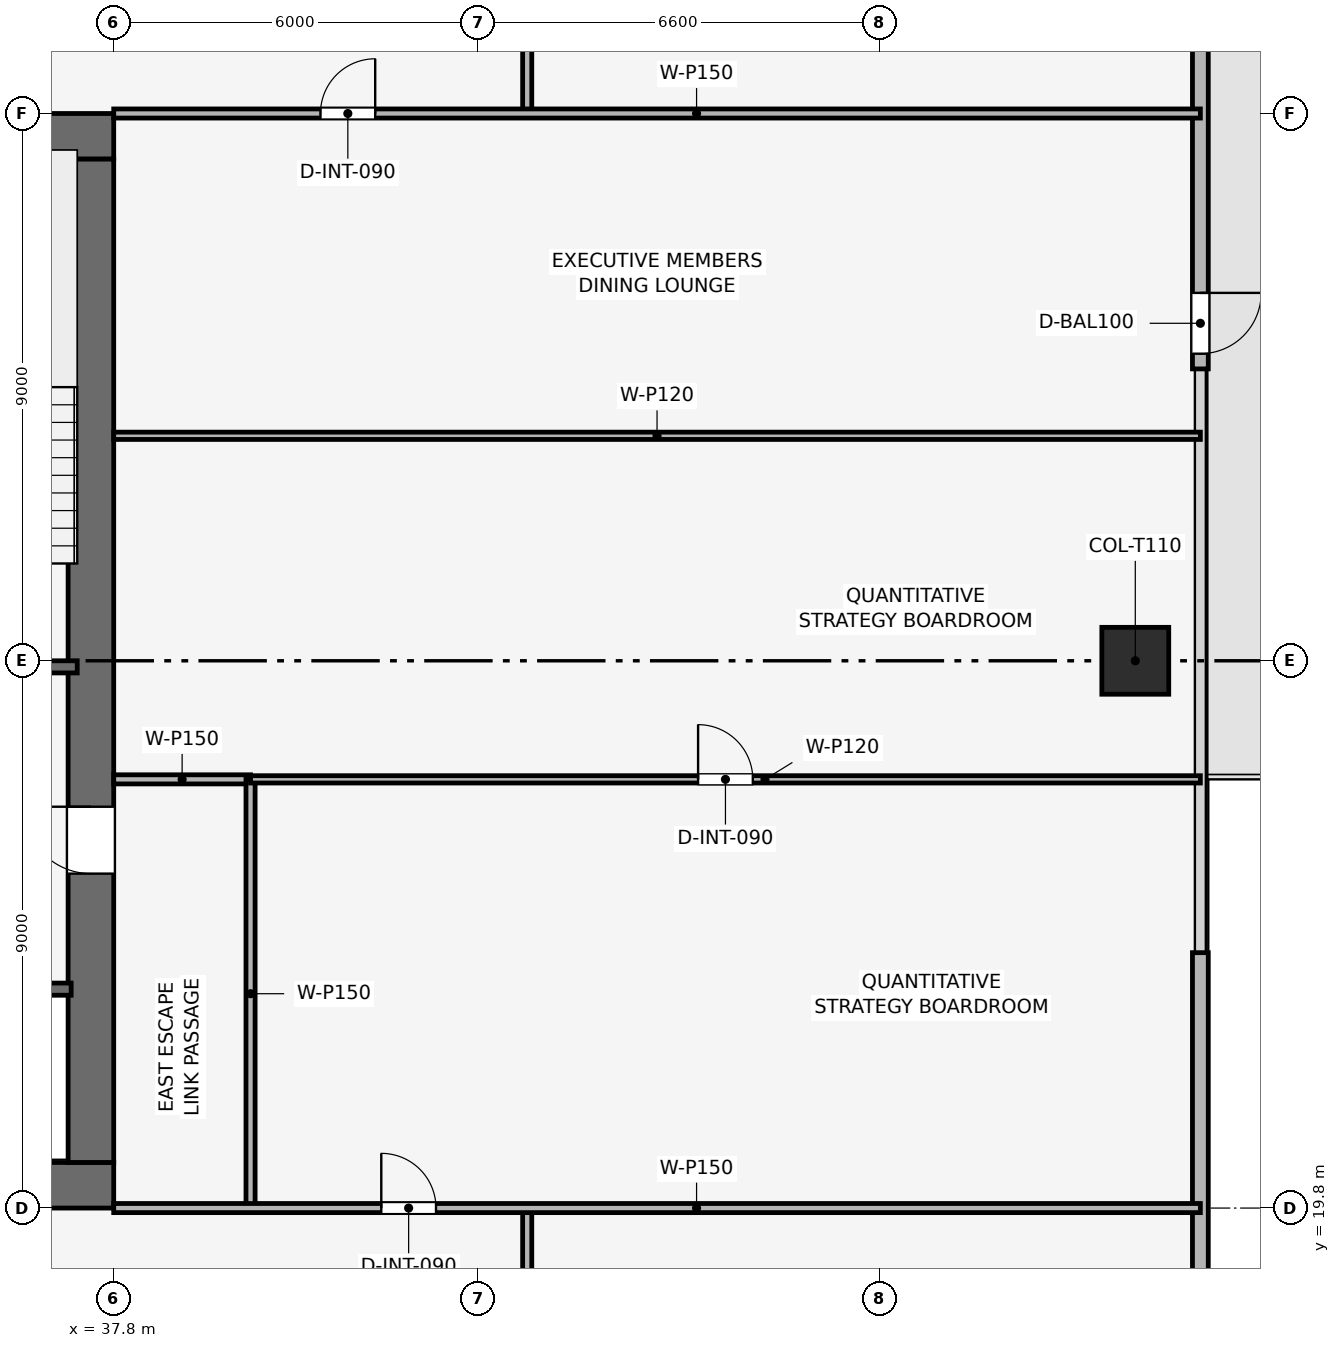
"""IFC4 building model, lengths in metres.
Left out: names, types, materials, properties, quantities, classifications, styles, units other than length and angle.
Written with IfcOpenShell. Run it as: python <this file> out.ifc"""

import sys

from ifc_helpers import new_model, si_unit, direction, frame, frame_2d, origin, origin_2d, place, context, subcontext, project, spatial, rectangle, extrude, element, fill, save


model = new_model("IFC4")
c1 = context("Model", 3, precision=1e-05, world=origin(), true_north=direction((0.0, 1.0)))
c2 = subcontext(c1, "Body", "Model", "MODEL_VIEW")
j1 = project(units=[si_unit("LENGTHUNIT", "METRE"), si_unit("PLANEANGLEUNIT", "RADIAN")], contexts=[c1])
p1 = place(None, origin())
s1 = spatial("IfcSite", under=j1, at=p1, CompositionType="ELEMENT")
p2 = place(p1, origin())
s2 = spatial("IfcBuilding", under=s1, at=p2, CompositionType="ELEMENT")
p3 = place(p2, frame((0.0, 0.0, 222.45)))
s3 = spatial("IfcBuildingStorey", under=s2, at=p3, CompositionType="ELEMENT", Elevation=222.45)
p4 = place(p3, frame((19.8, 20.175, 0.0), z_axis=(0.0, 0.0, 1.0), x_axis=(1.0, 0.0, 0.0)))
e1 = element("IfcWall", 1, at=p4, inside=s3, PredefinedType="SHEAR", context=c2, shape_type="SweptSolid", body=[
    extrude(rectangle(XDim=18.0, YDim=0.75, at=frame_2d((9.0, 0.0))), origin(), (0.0, 0.0, 1.0), 3.75),
])
p5 = place(p4, frame((8.4, 0.0, 0.0)))
e2 = element("IfcOpeningElement", 2, at=p5, cuts=e1, PredefinedType="OPENING", context=c2, shape_type="SweptSolid", body=[
    extrude(rectangle(XDim=1.2, YDim=2.2, at=frame_2d((0.6, 1.1))), frame((0.0, 0.385, 0.0), z_axis=(0.0, -1.0, 0.0), x_axis=(1.0, 0.0, 0.0)), (0.0, 0.0, 1.0), 0.77),
])
p6 = place(p3, frame((19.8, 37.425, 0.0), z_axis=(0.0, 0.0, 1.0), x_axis=(1.0, 0.0, 0.0)))
e3 = element("IfcWall", 3, at=p6, inside=s3, PredefinedType="SHEAR", context=c2, shape_type="SweptSolid", body=[
    extrude(rectangle(XDim=18.0, YDim=0.75, at=frame_2d((9.0, 0.0))), origin(), (0.0, 0.0, 1.0), 3.75),
])
p7 = place(p6, frame((7.05, 0.0, 0.0)))
e4 = element("IfcOpeningElement", 4, at=p7, cuts=e3, PredefinedType="OPENING", context=c2, shape_type="SweptSolid", body=[
    extrude(rectangle(XDim=1.1, YDim=2.15, at=frame_2d((0.55, 1.075))), frame((0.0, 0.385, 0.0), z_axis=(0.0, -1.0, 0.0), x_axis=(1.0, 0.0, 0.0)), (0.0, 0.0, 1.0), 0.77),
])
p8 = place(p3, frame((37.425, 20.55, 0.0), z_axis=(0.0, 0.0, 1.0), x_axis=(0.0, 1.0, 0.0)))
e5 = element("IfcWall", 5, at=p8, inside=s3, PredefinedType="SHEAR", context=c2, shape_type="SweptSolid", body=[
    extrude(rectangle(XDim=16.5, YDim=0.75, at=frame_2d((8.25, 0.0))), origin(), (0.0, 0.0, 1.0), 3.75),
])
p9 = place(p8, frame((4.75, 0.0, 0.0)))
e6 = element("IfcOpeningElement", 6, at=p9, cuts=e5, PredefinedType="OPENING", context=c2, shape_type="SweptSolid", body=[
    extrude(rectangle(XDim=1.1, YDim=2.15, at=frame_2d((0.55, 1.075))), frame((0.0, 0.385, 0.0), z_axis=(0.0, -1.0, 0.0), x_axis=(1.0, 0.0, 0.0)), (0.0, 0.0, 1.0), 0.77),
])
p10 = place(p3, frame((54.6, 28.8, 0.003), z_axis=(0.0, 0.0, 1.0), x_axis=(1.0, 0.0, 0.0)))
e7 = element("IfcColumn", 7, at=p10, inside=s3, PredefinedType="COLUMN", context=c2, shape_type="SweptSolid", body=[
    extrude(rectangle(XDim=1.1, YDim=1.1, at=origin_2d()), origin(), (0.0, 0.0, 1.0), 3.494),
])
p11 = place(p3, frame((55.67, 48.3, 0.0), z_axis=(0.0, 0.0, 1.0), x_axis=(0.0, -1.0, 0.0)))
e8 = element("IfcWall", 8, at=p11, inside=s3, PredefinedType="SOLIDWALL", context=c2, shape_type="SweptSolid", body=[
    extrude(rectangle(XDim=14.7, YDim=0.26, at=frame_2d((7.35, 0.0))), origin(), (0.0, 0.0, 1.0), 3.5),
])
p12 = place(p11, frame((13.45, 0.0, 0.0)))
e9 = element("IfcOpeningElement", 9, at=p12, cuts=e8, PredefinedType="OPENING", context=c2, shape_type="SweptSolid", body=[
    extrude(rectangle(XDim=1.0, YDim=2.2, at=frame_2d((0.5, 1.1))), frame((0.0, 0.14, 0.0), z_axis=(0.0, -1.0, 0.0), x_axis=(1.0, 0.0, 0.0)), (0.0, 0.0, 1.0), 0.28),
])
p13 = place(p3, frame((55.67, 24.0, 0.0), z_axis=(0.0, 0.0, 1.0), x_axis=(0.0, -1.0, 0.0)))
e10 = element("IfcWall", 10, at=p13, inside=s3, PredefinedType="SOLIDWALL", context=c2, shape_type="SweptSolid", body=[
    extrude(rectangle(XDim=14.7, YDim=0.26, at=frame_2d((7.35, 0.0))), origin(), (0.0, 0.0, 1.0), 3.5),
])
p14 = place(p13, frame((10.65, 0.0, 0.9)))
e11 = element("IfcOpeningElement", 11, at=p14, cuts=e10, PredefinedType="OPENING", context=c2, shape_type="SweptSolid", body=[
    extrude(rectangle(XDim=3.8, YDim=1.9, at=frame_2d((1.9, 0.95))), frame((0.0, 0.14, 0.0), z_axis=(0.0, -1.0, 0.0), x_axis=(1.0, 0.0, 0.0)), (0.0, 0.0, 1.0), 0.28),
])
p15 = place(p3, frame((34.05, 28.7, 0.0), z_axis=(0.0, 0.0, 1.0), x_axis=(1.0, 0.0, 0.0)))
e12 = element("IfcWall", 12, at=p15, inside=s3, PredefinedType="SHEAR", context=c2, shape_type="SweptSolid", body=[
    extrude(rectangle(XDim=3.15, YDim=0.2, at=frame_2d((1.575, 0.0))), origin(), (0.0, 0.0, 1.0), 3.5),
])
p16 = place(p15, frame((0.8, 0.0, 0.0)))
e13 = element("IfcOpeningElement", 13, at=p16, cuts=e12, PredefinedType="OPENING", context=c2, shape_type="SweptSolid", body=[
    extrude(rectangle(XDim=1.0, YDim=2.1, at=frame_2d((0.5, 1.05))), frame((0.0, 0.11, 0.0), z_axis=(0.0, -1.0, 0.0), x_axis=(1.0, 0.0, 0.0)), (0.0, 0.0, 1.0), 0.22),
])
p17 = place(p3, frame((34.05, 23.4, 0.0), z_axis=(0.0, 0.0, 1.0), x_axis=(1.0, 0.0, 0.0)))
e14 = element("IfcWall", 14, at=p17, inside=s3, PredefinedType="SHEAR", context=c2, shape_type="SweptSolid", body=[
    extrude(rectangle(XDim=3.05, YDim=0.2, at=frame_2d((1.525, 0.0))), origin(), (0.0, 0.0, 1.0), 3.5),
])
p18 = place(p17, frame((1.2, 0.0, 0.0)))
e15 = element("IfcOpeningElement", 15, at=p18, cuts=e14, PredefinedType="OPENING", context=c2, shape_type="SweptSolid", body=[
    extrude(rectangle(XDim=1.1, YDim=2.15, at=frame_2d((0.55, 1.075))), frame((0.0, 0.11, 0.0), z_axis=(0.0, -1.0, 0.0), x_axis=(1.0, 0.0, 0.0)), (0.0, 0.0, 1.0), 0.22),
])
p19 = place(p3, frame((37.8, 26.85, 0.0), z_axis=(0.0, 0.0, 1.0), x_axis=(1.0, 0.0, 0.0)))
e16 = element("IfcWall", 16, at=p19, inside=s3, PredefinedType="PARTITIONING", context=c2, shape_type="SweptSolid", body=[
    extrude(rectangle(XDim=2.25, YDim=0.15, at=frame_2d((1.125, 0.0))), origin(), (0.0, 0.0, 1.0), 3.5),
])
p20 = place(p3, frame((40.05, 19.8, 0.0), z_axis=(0.0, 0.0, 1.0), x_axis=(0.0, 1.0, 0.0)))
e17 = element("IfcWall", 17, at=p20, inside=s3, PredefinedType="PARTITIONING", context=c2, shape_type="SweptSolid", body=[
    extrude(rectangle(XDim=7.05, YDim=0.15, at=frame_2d((3.525, 0.0))), origin(), (0.0, 0.0, 1.0), 3.035),
])
p21 = place(p3, frame((40.05, 26.85, 0.0), z_axis=(0.0, 0.0, 1.0), x_axis=(1.0, 0.0, 0.0)))
e18 = element("IfcWall", 18, at=p21, inside=s3, PredefinedType="PARTITIONING", context=c2, shape_type="SweptSolid", body=[
    extrude(rectangle(XDim=15.62, YDim=0.12, at=frame_2d((7.81, 0.0))), origin(), (0.0, 0.0, 1.0), 2.885),
])
p22 = place(p21, frame((7.36, 0.0, 0.0)))
e19 = element("IfcOpeningElement", 19, at=p22, cuts=e18, PredefinedType="OPENING", context=c2, shape_type="SweptSolid", body=[
    extrude(rectangle(XDim=0.9, YDim=2.1, at=frame_2d((0.45, 1.05))), frame((0.0, 0.07, 0.0), z_axis=(0.0, -1.0, 0.0), x_axis=(1.0, 0.0, 0.0)), (0.0, 0.0, 1.0), 0.14),
])
p23 = place(p3, frame((37.8, 32.5, 0.0), z_axis=(0.0, 0.0, 1.0), x_axis=(1.0, 0.0, 0.0)))
e20 = element("IfcWall", 20, at=p23, inside=s3, PredefinedType="PARTITIONING", context=c2, shape_type="SweptSolid", body=[
    extrude(rectangle(XDim=17.87, YDim=0.12, at=frame_2d((8.935, 0.0))), origin(), (0.0, 0.0, 1.0), 2.885),
])
p24 = place(p3, frame((44.6, 17.4, 0.0), z_axis=(0.0, 0.0, 1.0), x_axis=(0.0, 1.0, 0.0)))
e21 = element("IfcWall", 21, at=p24, inside=s3, PredefinedType="PARTITIONING", context=c2, shape_type="SweptSolid", body=[
    extrude(rectangle(XDim=2.4, YDim=0.15, at=frame_2d((1.2, 0.0))), origin(), (0.0, 0.0, 1.0), 3.5),
])
p25 = place(p3, frame((44.6, 37.8, 0.0), z_axis=(0.0, 0.0, 1.0), x_axis=(0.0, 1.0, 0.0)))
e22 = element("IfcWall", 22, at=p25, inside=s3, PredefinedType="PARTITIONING", context=c2, shape_type="SweptSolid", body=[
    extrude(rectangle(XDim=2.4, YDim=0.15, at=frame_2d((1.2, 0.0))), origin(), (0.0, 0.0, 1.0), 3.5),
])
p26 = place(p3, frame((37.8, 19.8, 0.0), z_axis=(0.0, 0.0, 1.0), x_axis=(1.0, 0.0, 0.0)))
e23 = element("IfcWall", 23, at=p26, inside=s3, PredefinedType="PARTITIONING", context=c2, shape_type="SweptSolid", body=[
    extrude(rectangle(XDim=17.87, YDim=0.15, at=frame_2d((8.935, 0.0))), origin(), (0.0, 0.0, 1.0), 2.885),
])
p27 = place(p26, frame((4.4, 0.0, 0.0)))
e24 = element("IfcOpeningElement", 24, at=p27, cuts=e23, PredefinedType="OPENING", context=c2, shape_type="SweptSolid", body=[
    extrude(rectangle(XDim=0.9, YDim=2.1, at=frame_2d((0.45, 1.05))), frame((0.0, 0.085, 0.0), z_axis=(0.0, -1.0, 0.0), x_axis=(1.0, 0.0, 0.0)), (0.0, 0.0, 1.0), 0.17),
])
p28 = place(p3, frame((37.8, 37.8, 0.0), z_axis=(0.0, 0.0, 1.0), x_axis=(1.0, 0.0, 0.0)))
e25 = element("IfcWall", 25, at=p28, inside=s3, PredefinedType="PARTITIONING", context=c2, shape_type="SweptSolid", body=[
    extrude(rectangle(XDim=17.87, YDim=0.15, at=frame_2d((8.935, 0.0))), origin(), (0.0, 0.0, 1.0), 2.885),
])
p29 = place(p28, frame((3.4, 0.0, 0.0)))
e26 = element("IfcOpeningElement", 26, at=p29, cuts=e25, PredefinedType="OPENING", context=c2, shape_type="SweptSolid", body=[
    extrude(rectangle(XDim=0.9, YDim=2.1, at=frame_2d((0.45, 1.05))), frame((0.0, 0.085, 0.0), z_axis=(0.0, -1.0, 0.0), x_axis=(1.0, 0.0, 0.0)), (0.0, 0.0, 1.0), 0.17),
])
p30 = place(p12, origin())
e27 = element("IfcDoor", 27, at=p30, inside=s3, OperationType="SINGLE_SWING_LEFT", PredefinedType="DOOR", context=c2, shape_type="SweptSolid", body=[
    extrude(rectangle(XDim=1.0, YDim=2.2, at=frame_2d((0.5, 1.1))), frame((0.0, 0.025, 0.0), z_axis=(0.0, -1.0, 0.0), x_axis=(1.0, 0.0, 0.0)), (0.0, 0.0, 1.0), 0.05),
])
fill(e9, e27)
p31 = place(p22, origin())
e28 = element("IfcDoor", 28, at=p31, inside=s3, OperationType="SINGLE_SWING_LEFT", PredefinedType="DOOR", context=c2, shape_type="SweptSolid", body=[
    extrude(rectangle(XDim=0.9, YDim=2.1, at=frame_2d((0.45, 1.05))), frame((0.0, 0.025, 0.0), z_axis=(0.0, -1.0, 0.0), x_axis=(1.0, 0.0, 0.0)), (0.0, 0.0, 1.0), 0.05),
])
fill(e19, e28)
p32 = place(p27, origin())
e29 = element("IfcDoor", 29, at=p32, inside=s3, OperationType="SINGLE_SWING_LEFT", PredefinedType="DOOR", context=c2, shape_type="SweptSolid", body=[
    extrude(rectangle(XDim=0.9, YDim=2.1, at=frame_2d((0.45, 1.05))), frame((0.0, 0.025, 0.0), z_axis=(0.0, -1.0, 0.0), x_axis=(1.0, 0.0, 0.0)), (0.0, 0.0, 1.0), 0.05),
])
fill(e24, e29)
p33 = place(p29, origin())
e30 = element("IfcDoor", 30, at=p33, inside=s3, OperationType="SINGLE_SWING_RIGHT", PredefinedType="DOOR", context=c2, shape_type="SweptSolid", body=[
    extrude(rectangle(XDim=0.9, YDim=2.1, at=frame_2d((0.45, 1.05))), frame((0.0, 0.025, 0.0), z_axis=(0.0, -1.0, 0.0), x_axis=(1.0, 0.0, 0.0)), (0.0, 0.0, 1.0), 0.05),
])
fill(e26, e30)
p34 = place(p9, origin())
e31 = element("IfcDoor", 31, at=p34, inside=s3, OperationType="SINGLE_SWING_RIGHT", PredefinedType="DOOR", context=c2, shape_type="SweptSolid", body=[
    extrude(rectangle(XDim=1.1, YDim=2.15, at=frame_2d((0.55, 1.075))), frame((0.0, 0.025, 0.0), z_axis=(0.0, -1.0, 0.0), x_axis=(1.0, 0.0, 0.0)), (0.0, 0.0, 1.0), 0.05),
])
fill(e6, e31)
save(model, sys.argv[1])
